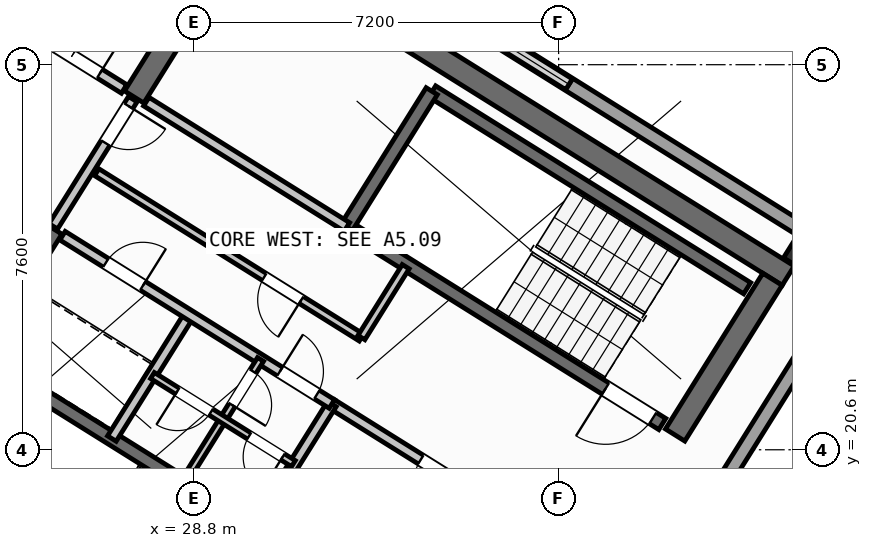
"""IFC4 building model, lengths in metres.
Left out: names, types, materials, properties, quantities, classifications, styles, units other than length and angle.
Written with IfcOpenShell. Run it as: python <this file> out.ifc"""

import sys

from ifc_helpers import new_model, si_unit, direction, frame, frame_2d, origin, origin_2d, place, context, subcontext, project, spatial, rectangle, hollow_rectangle, extrude, source, transform, mapped, element, fill, save


model = new_model("IFC4")
c1 = context("Model", 3, precision=1e-05, world=origin(), true_north=direction((0.0, 1.0)))
c2 = subcontext(c1, "Body", "Model", "MODEL_VIEW")
j1 = project(units=[si_unit("LENGTHUNIT", "METRE"), si_unit("PLANEANGLEUNIT", "RADIAN")], contexts=[c1])
p1 = place(None, origin())
s1 = spatial("IfcSite", under=j1, at=p1, CompositionType="ELEMENT")
p2 = place(p1, origin())
s2 = spatial("IfcBuilding", under=s1, at=p2, CompositionType="ELEMENT")
p3 = place(p2, frame((0.0, 0.0, 306.0)))
s3 = spatial("IfcBuildingStorey", under=s2, at=p3, CompositionType="ELEMENT", Elevation=306.0)
p4 = place(p3, frame((40.531, 24.036, 0.0), z_axis=(0.0, 0.0, 1.0), x_axis=(-0.848048787466, 0.529918157905, 0.0)))
e1 = element("IfcWall", 1, at=p4, inside=s3, PredefinedType="SHEAR", context=c2, shape_type="SweptSolid", body=[
    extrude(rectangle(XDim=13.04, YDim=0.45, at=frame_2d((6.52, 0.0))), origin(), (0.0, 0.0, 1.0), 3.32),
])
for number, where, z_axis, x_axis in (
    (2, (40.221, 23.965, 0.0), (0.0, 0.0, 1.0), (-0.53, -0.848, 0.0)),
    (3, (29.544, 30.636, 0.0), (0.0, 0.0, 1.0), (-0.53, -0.848, 0.0)),
):
    element("IfcWall", number, at=place(p3, frame(where, z_axis=z_axis, x_axis=x_axis)), inside=s3, PredefinedType="SHEAR", context=c2, shape_type="SweptSolid", body=[
        extrude(rectangle(XDim=3.625, YDim=0.45, at=frame_2d((1.812, 0.0))), origin(), (0.0, 0.0, 1.0), 3.32),
    ])
p5 = place(p3, frame((26.007, 24.976, 0.0), z_axis=(0.0, 0.0, 1.0), x_axis=(-0.529931155655, -0.848040665456, 0.0)))
e4 = element("IfcWall", 4, at=p5, inside=s3, PredefinedType="SHEAR", context=c2, shape_type="SweptSolid", body=[
    extrude(rectangle(XDim=6.475, YDim=0.45, at=frame_2d((3.238, 0.0))), origin(), (0.0, 0.0, 1.0), 3.32),
])
m1 = source(origin(), c2, "Body", "SweptSolid", [
    extrude(hollow_rectangle(XDim=0.5, YDim=0.5, WallThickness=0.025, at=origin_2d()), origin(), (0.0, 0.0, 1.0), 3.6),
])
p6 = place(p3, frame((40.783, 24.469, 0.0), z_axis=(0.0, 0.0, 1.0), x_axis=(-0.848048096156, 0.529919264233, 0.0)))
e5 = element("IfcColumn", 5, at=p6, inside=s3, PredefinedType="COLUMN", context=c2, shape_type="MappedRepresentation", body=[
    mapped(m1, transform((0.0, 0.0, 0.0), scale=1.0)),
])
p7 = place(p3, frame((41.182, 23.031, 0.0), z_axis=(0.0, 0.0, 1.0), x_axis=(-0.529922292894, -0.848046203632, 0.0)))
e6 = element("IfcWall", 6, at=p7, inside=s3, PredefinedType="STANDARD", context=c2, shape_type="SweptSolid", body=[
    extrude(rectangle(XDim=16.034, YDim=0.28, at=frame_2d((8.017, 0.0))), origin(), (0.0, 0.0, 1.0), 3.32),
])
p8 = place(p7, frame((7.167, 0.0, 0.85)))
e7 = element("IfcOpeningElement", 7, at=p8, cuts=e6, PredefinedType="OPENING", context=c2, shape_type="SweptSolid", body=[
    extrude(rectangle(XDim=1.7, YDim=1.6, at=frame_2d((0.85, 0.8))), frame((0.0, 0.15, 0.0), z_axis=(0.0, -1.0, 0.0), x_axis=(1.0, 0.0, 0.0)), (0.0, 0.0, 1.0), 0.3),
])
p9 = place(p3, frame((24.631, 35.045, 0.0), z_axis=(0.0, 0.0, 1.0), x_axis=(0.848046707212, -0.529921487002, 0.0)))
e8 = element("IfcWall", 8, at=p9, inside=s3, PredefinedType="STANDARD", context=c2, shape_type="SweptSolid", body=[
    extrude(rectangle(XDim=18.984, YDim=0.28, at=frame_2d((9.492, 0.0))), origin(), (0.0, 0.0, 1.0), 3.32),
])
p10 = place(p9, frame((2.326, 0.0, 0.85)))
e9 = element("IfcOpeningElement", 9, at=p10, cuts=e8, PredefinedType="OPENING", context=c2, shape_type="SweptSolid", body=[
    extrude(rectangle(XDim=1.7, YDim=1.6, at=frame_2d((0.85, 0.8))), frame((0.0, 0.15, 0.0), z_axis=(0.0, -1.0, 0.0), x_axis=(1.0, 0.0, 0.0)), (0.0, 0.0, 1.0), 0.3),
])
p11 = place(p9, frame((11.968, 0.0, 0.85)))
e10 = element("IfcOpeningElement", 10, at=p11, cuts=e8, PredefinedType="OPENING", context=c2, shape_type="SweptSolid", body=[
    extrude(rectangle(XDim=1.7, YDim=1.6, at=frame_2d((0.85, 0.8))), frame((0.0, 0.15, 0.0), z_axis=(0.0, -1.0, 0.0), x_axis=(1.0, 0.0, 0.0)), (0.0, 0.0, 1.0), 0.3),
])
p12 = place(p3, frame((31.28, 18.261, 0.0), z_axis=(0.0, 0.0, 1.0), x_axis=(-0.848051618787, 0.529913626805, 0.0)))
e11 = element("IfcWall", 11, at=p12, inside=s3, PredefinedType="SHEAR", context=c2, shape_type="SweptSolid", body=[
    extrude(rectangle(XDim=7.46, YDim=0.26, at=frame_2d((3.73, 0.0))), origin(), (0.0, 0.0, 1.0), 3.32),
])
p13 = place(p12, frame((0.36, 0.0, 0.0)))
e12 = element("IfcOpeningElement", 12, at=p13, cuts=e11, PredefinedType="OPENING", context=c2, shape_type="SweptSolid", body=[
    extrude(rectangle(XDim=0.86, YDim=2.05, at=frame_2d((0.43, 1.025))), frame((0.0, 0.14, 0.0), z_axis=(0.0, -1.0, 0.0), x_axis=(1.0, 0.0, 0.0)), (0.0, 0.0, 1.0), 0.28),
])
p14 = place(p3, frame((39.721, 23.788, 0.0), z_axis=(0.0, 0.0, 1.0), x_axis=(-0.848054434086, 0.529909121291, 0.0)))
e13 = element("IfcWall", 13, at=p14, inside=s3, PredefinedType="SHEAR", context=c2, shape_type="SweptSolid", body=[
    extrude(rectangle(XDim=7.33, YDim=0.26, at=frame_2d((3.665, 0.0))), origin(), (0.0, 0.0, 1.0), 3.32),
])
p15 = place(p3, frame((38.046, 21.108, 0.0), z_axis=(0.0, 0.0, 1.0), x_axis=(-0.848054434086, 0.529909121291, 0.0)))
e14 = element("IfcWall", 14, at=p15, inside=s3, PredefinedType="SHEAR", context=c2, shape_type="SweptSolid", body=[
    extrude(rectangle(XDim=7.33, YDim=0.26, at=frame_2d((3.665, 0.0))), origin(), (0.0, 0.0, 1.0), 3.32),
])
p16 = place(p15, frame((0.22, 0.0, 0.0)))
e15 = element("IfcOpeningElement", 15, at=p16, cuts=e14, PredefinedType="OPENING", context=c2, shape_type="SweptSolid", body=[
    extrude(rectangle(XDim=1.1, YDim=2.1, at=frame_2d((0.55, 1.05))), frame((0.0, 0.14, 0.0), z_axis=(0.0, -1.0, 0.0), x_axis=(1.0, 0.0, 0.0)), (0.0, 0.0, 1.0), 0.28),
])
p17 = place(p3, frame((33.496, 27.677, 0.0), z_axis=(0.0, 0.0, 1.0), x_axis=(-0.529908658664, -0.84805472316, 0.0)))
e16 = element("IfcWall", 16, at=p17, inside=s3, PredefinedType="SHEAR", context=c2, shape_type="SweptSolid", body=[
    extrude(rectangle(XDim=3.16, YDim=0.26, at=frame_2d((1.58, 0.0))), origin(), (0.0, 0.0, 1.0), 3.32),
])
p18 = place(p3, frame((36.459, 18.421, 0.0), z_axis=(0.0, 0.0, 1.0), x_axis=(-0.848059591691, 0.529900867089, 0.0)))
e17 = element("IfcWall", 17, at=p18, inside=s3, PredefinedType="STANDARD", context=c2, shape_type="SweptSolid", body=[
    extrude(rectangle(XDim=5.818, YDim=0.2, at=frame_2d((2.909, 0.0))), origin(), (0.0, 0.0, 1.0), 3.31),
])
p19 = place(p18, frame((2.598, 0.0, 0.0)))
e18 = element("IfcOpeningElement", 18, at=p19, cuts=e17, PredefinedType="OPENING", context=c2, shape_type="SweptSolid", body=[
    extrude(rectangle(XDim=1.15, YDim=2.1, at=frame_2d((0.575, 1.05))), frame((0.0, 0.11, 0.0), z_axis=(0.0, -1.0, 0.0), x_axis=(1.0, 0.0, 0.0)), (0.0, 0.0, 1.0), 0.22),
])
p20 = place(p3, frame((31.822, 24.998, 0.0), z_axis=(0.0, 0.0, 1.0), x_axis=(-0.848054125777, 0.529909614701, 0.0)))
e19 = element("IfcWall", 19, at=p20, inside=s3, PredefinedType="STANDARD", context=c2, shape_type="SweptSolid", body=[
    extrude(rectangle(XDim=4.668, YDim=0.2, at=frame_2d((2.334, 0.0))), origin(), (0.0, 0.0, 1.0), 3.31),
])
p21 = place(p3, frame((32.108, 22.814, 0.0), z_axis=(0.0, 0.0, 1.0), x_axis=(-0.848047283855, 0.529920564185, 0.0)))
e20 = element("IfcWall", 20, at=p21, inside=s3, PredefinedType="PARTITIONING", context=c2, shape_type="SweptSolid", body=[
    extrude(rectangle(XDim=6.16, YDim=0.16, at=frame_2d((3.08, 0.0))), origin(), (0.0, 0.0, 1.0), 3.31),
])
p22 = place(p21, frame((1.4, 0.0, 0.0)))
e21 = element("IfcOpeningElement", 21, at=p22, cuts=e20, PredefinedType="OPENING", context=c2, shape_type="SweptSolid", body=[
    extrude(rectangle(XDim=0.86, YDim=2.05, at=frame_2d((0.43, 1.025))), frame((0.0, 0.09, 0.0), z_axis=(0.0, -1.0, 0.0), x_axis=(1.0, 0.0, 0.0)), (0.0, 0.0, 1.0), 0.18),
])
p23 = place(p3, frame((32.982, 24.213, 0.0), z_axis=(0.0, 0.0, 1.0), x_axis=(-0.529839334948, -0.84809803628, 0.0)))
e22 = element("IfcWall", 22, at=p23, inside=s3, PredefinedType="PARTITIONING", context=c2, shape_type="SweptSolid", body=[
    extrude(rectangle(XDim=1.65, YDim=0.16, at=frame_2d((0.825, 0.0))), origin(), (0.0, 0.0, 1.0), 3.31),
])
for number, where, z_axis, x_axis in (
    (23, (31.525, 21.504, 0.0), (0.0, 0.0, 1.0), (-0.53, -0.848, 0.0)),
    (24, (28.71, 23.263, 0.0), (0.0, 0.0, 1.0), (-0.53, -0.848, 0.0)),
):
    element("IfcWall", number, at=place(p3, frame(where, z_axis=z_axis, x_axis=x_axis)), inside=s3, PredefinedType="STANDARD", context=c2, shape_type="SweptSolid", body=[
        extrude(rectangle(XDim=2.88, YDim=0.2, at=frame_2d((1.44, 0.0))), origin(), (0.0, 0.0, 1.0), 3.31),
    ])
p24 = place(p3, frame((31.525, 21.504, 0.0), z_axis=(0.0, 0.0, 1.0), x_axis=(-0.848042066329, 0.529928913853, 0.0)))
e25 = element("IfcWall", 25, at=p24, inside=s3, PredefinedType="STANDARD", context=c2, shape_type="SweptSolid", body=[
    extrude(rectangle(XDim=6.268, YDim=0.2, at=frame_2d((3.134, 0.0))), origin(), (0.0, 0.0, 1.0), 3.31),
])
p25 = place(p24, frame((4.4, 0.0, 0.0)))
e26 = element("IfcOpeningElement", 26, at=p25, cuts=e25, PredefinedType="OPENING", context=c2, shape_type="SweptSolid", body=[
    extrude(rectangle(XDim=0.86, YDim=2.05, at=frame_2d((0.43, 1.025))), frame((0.0, 0.11, 0.0), z_axis=(0.0, -1.0, 0.0), x_axis=(1.0, 0.0, 0.0)), (0.0, 0.0, 1.0), 0.22),
])
p26 = place(p24, frame((0.35, 0.0, 0.0)))
e27 = element("IfcOpeningElement", 27, at=p26, cuts=e25, PredefinedType="OPENING", context=c2, shape_type="SweptSolid", body=[
    extrude(rectangle(XDim=0.86, YDim=2.05, at=frame_2d((0.43, 1.025))), frame((0.0, 0.11, 0.0), z_axis=(0.0, -1.0, 0.0), x_axis=(1.0, 0.0, 0.0)), (0.0, 0.0, 1.0), 0.22),
])
p27 = place(p3, frame((30.117, 22.384, 0.0), z_axis=(0.0, 0.0, 1.0), x_axis=(-0.529951914384, -0.848027693204, 0.0)))
e28 = element("IfcWall", 28, at=p27, inside=s3, PredefinedType="PLUMBINGWALL", context=c2, shape_type="SweptSolid", body=[
    extrude(rectangle(XDim=1.4, YDim=0.14, at=frame_2d((0.7, 0.0))), origin(), (0.0, 0.0, 1.0), 3.31),
])
p28 = place(p27, frame((0.28, 0.0, 0.0)))
e29 = element("IfcOpeningElement", 29, at=p28, cuts=e28, PredefinedType="OPENING", context=c2, shape_type="SweptSolid", body=[
    extrude(rectangle(XDim=0.78, YDim=2.05, at=frame_2d((0.39, 1.025))), frame((0.0, 0.08, 0.0), z_axis=(0.0, -1.0, 0.0), x_axis=(1.0, 0.0, 0.0)), (0.0, 0.0, 1.0), 0.16),
])
p29 = place(p3, frame((29.375, 21.196, 0.0), z_axis=(0.0, 0.0, 1.0), x_axis=(-0.529865479138, -0.848081702443, 0.0)))
e30 = element("IfcWall", 30, at=p29, inside=s3, PredefinedType="PLUMBINGWALL", context=c2, shape_type="SweptSolid", body=[
    extrude(rectangle(XDim=1.48, YDim=0.14, at=frame_2d((0.74, 0.0))), origin(), (0.0, 0.0, 1.0), 3.31),
])
p30 = place(p3, frame((30.766, 20.327, 0.0), z_axis=(0.0, 0.0, 1.0), x_axis=(-0.848052663127, 0.529911955482, 0.0)))
e31 = element("IfcWall", 31, at=p30, inside=s3, PredefinedType="PLUMBINGWALL", context=c2, shape_type="SweptSolid", body=[
    extrude(rectangle(XDim=3.28, YDim=0.14, at=frame_2d((1.64, 0.0))), origin(), (0.0, 0.0, 1.0), 3.31),
])
p31 = place(p30, frame((0.25, 0.0, 0.0)))
e32 = element("IfcOpeningElement", 32, at=p31, cuts=e31, PredefinedType="OPENING", context=c2, shape_type="SweptSolid", body=[
    extrude(rectangle(XDim=0.78, YDim=2.05, at=frame_2d((0.39, 1.025))), frame((0.0, 0.08, 0.0), z_axis=(0.0, -1.0, 0.0), x_axis=(1.0, 0.0, 0.0)), (0.0, 0.0, 1.0), 0.16),
])
p32 = place(p30, frame((1.92, 0.0, 0.0)))
e33 = element("IfcOpeningElement", 33, at=p32, cuts=e31, PredefinedType="OPENING", context=c2, shape_type="SweptSolid", body=[
    extrude(rectangle(XDim=0.78, YDim=2.05, at=frame_2d((0.39, 1.025))), frame((0.0, 0.08, 0.0), z_axis=(0.0, -1.0, 0.0), x_axis=(1.0, 0.0, 0.0)), (0.0, 0.0, 1.0), 0.16),
])
p33 = place(p3, frame((27.596, 27.52, 0.0), z_axis=(0.0, 0.0, 1.0), x_axis=(-0.529865479138, -0.848081702443, 0.0)))
e34 = element("IfcWall", 34, at=p33, inside=s3, PredefinedType="STANDARD", context=c2, shape_type="SweptSolid", body=[
    extrude(rectangle(XDim=2.96, YDim=0.2, at=frame_2d((1.48, 0.0))), origin(), (0.0, 0.0, 1.0), 3.31),
])
p34 = place(p33, frame((0.16, 0.0, 0.0)))
e35 = element("IfcOpeningElement", 35, at=p34, cuts=e34, PredefinedType="OPENING", context=c2, shape_type="SweptSolid", body=[
    extrude(rectangle(XDim=0.86, YDim=2.05, at=frame_2d((0.43, 1.025))), frame((0.0, 0.11, 0.0), z_axis=(0.0, -1.0, 0.0), x_axis=(1.0, 0.0, 0.0)), (0.0, 0.0, 1.0), 0.22),
])
p35 = place(p3, frame((27.425, 27.721, 0.0), z_axis=(0.0, 0.0, 1.0), x_axis=(-0.848060820519, 0.529898900452, 0.0)))
e36 = element("IfcWall", 36, at=p35, inside=s3, PredefinedType="STANDARD", context=c2, shape_type="SweptSolid", body=[
    extrude(rectangle(XDim=7.678, YDim=0.2, at=frame_2d((3.839, 0.0))), origin(), (0.0, 0.0, 1.0), 3.31),
])
p36 = place(p35, frame((0.568, 0.0, 0.0)))
e37 = element("IfcOpeningElement", 37, at=p36, cuts=e36, PredefinedType="OPENING", context=c2, shape_type="SweptSolid", body=[
    extrude(rectangle(XDim=1.3, YDim=2.15, at=frame_2d((0.65, 1.075))), frame((0.0, 0.11, 0.0), z_axis=(0.0, -1.0, 0.0), x_axis=(1.0, 0.0, 0.0)), (0.0, 0.0, 1.0), 0.22),
])
m2 = source(origin(), c2, "Body", "SweptSolid", [
    extrude(rectangle(XDim=1.7, YDim=1.6, at=frame_2d((0.85, 0.8))), frame((0.0, 0.03, 0.0), z_axis=(0.0, -1.0, 0.0), x_axis=(1.0, 0.0, 0.0)), (0.0, 0.0, 1.0), 0.06),
])
p37 = place(p11, origin())
e38 = element("IfcWindow", 38, at=p37, inside=s3, PartitioningType="SINGLE_PANEL", PredefinedType="WINDOW", context=c2, shape_type="MappedRepresentation", body=[
    mapped(m2, transform((0.0, 0.0, 0.0), scale=1.0)),
])
fill(e10, e38)
m3 = source(origin(), c2, "Body", "SweptSolid", [
    extrude(rectangle(XDim=0.86, YDim=2.05, at=frame_2d((0.43, 1.025))), frame((0.0, 0.025, 0.0), z_axis=(0.0, -1.0, 0.0), x_axis=(1.0, 0.0, 0.0)), (0.0, 0.0, 1.0), 0.05),
])
p38 = place(p22, origin())
e39 = element("IfcDoor", 39, at=p38, inside=s3, OperationType="SINGLE_SWING_LEFT", PredefinedType="DOOR", context=c2, shape_type="MappedRepresentation", body=[
    mapped(m3, transform((0.0, 0.0, 0.0), scale=1.0)),
])
fill(e21, e39)
m4 = source(origin(), c2, "Body", "SweptSolid", [
    extrude(rectangle(XDim=1.1, YDim=2.1, at=frame_2d((0.55, 1.05))), frame((0.0, 0.025, 0.0), z_axis=(0.0, -1.0, 0.0), x_axis=(1.0, 0.0, 0.0)), (0.0, 0.0, 1.0), 0.05),
])
p39 = place(p16, origin())
e40 = element("IfcDoor", 40, at=p39, inside=s3, OperationType="SINGLE_SWING_RIGHT", PredefinedType="DOOR", context=c2, shape_type="MappedRepresentation", body=[
    mapped(m4, transform((0.0, 0.0, 0.0), scale=1.0)),
])
fill(e15, e40)
m5 = source(origin(), c2, "Body", "SweptSolid", [
    extrude(rectangle(XDim=1.15, YDim=2.1, at=frame_2d((0.575, 1.05))), frame((0.0, 0.025, 0.0), z_axis=(0.0, -1.0, 0.0), x_axis=(1.0, 0.0, 0.0)), (0.0, 0.0, 1.0), 0.05),
])
p40 = place(p19, origin())
e41 = element("IfcDoor", 41, at=p40, inside=s3, OperationType="SINGLE_SWING_LEFT", PredefinedType="DOOR", context=c2, shape_type="MappedRepresentation", body=[
    mapped(m5, transform((0.0, 0.0, 0.0), scale=1.0)),
])
fill(e18, e41)
p41 = place(p25, frame((0.86, 0.0, 0.0), z_axis=(0.0, 0.0, 1.0), x_axis=(-1.0, 0.0, 0.0)))
e42 = element("IfcDoor", 42, at=p41, inside=s3, OperationType="SINGLE_SWING_RIGHT", PredefinedType="DOOR", context=c2, shape_type="MappedRepresentation", body=[
    mapped(m3, transform((0.0, 0.0, 0.0), scale=1.0)),
])
fill(e26, e42)
p42 = place(p26, frame((0.86, 0.0, 0.0), z_axis=(0.0, 0.0, 1.0), x_axis=(-1.0, 0.0, 0.0)))
e43 = element("IfcDoor", 43, at=p42, inside=s3, OperationType="SINGLE_SWING_LEFT", PredefinedType="DOOR", context=c2, shape_type="MappedRepresentation", body=[
    mapped(m3, transform((0.0, 0.0, 0.0), scale=1.0)),
])
fill(e27, e43)
m6 = source(origin(), c2, "Body", "SweptSolid", [
    extrude(rectangle(XDim=0.78, YDim=2.05, at=frame_2d((0.39, 1.025))), frame((0.0, 0.025, 0.0), z_axis=(0.0, -1.0, 0.0), x_axis=(1.0, 0.0, 0.0)), (0.0, 0.0, 1.0), 0.05),
])
p43 = place(p28, origin())
e44 = element("IfcDoor", 44, at=p43, inside=s3, OperationType="SINGLE_SWING_RIGHT", PredefinedType="DOOR", context=c2, shape_type="MappedRepresentation", body=[
    mapped(m6, transform((0.0, 0.0, 0.0), scale=1.0)),
])
fill(e29, e44)
p44 = place(p31, origin())
e45 = element("IfcDoor", 45, at=p44, inside=s3, OperationType="SINGLE_SWING_LEFT", PredefinedType="DOOR", context=c2, shape_type="MappedRepresentation", body=[
    mapped(m6, transform((0.0, 0.0, 0.0), scale=1.0)),
])
fill(e32, e45)
p45 = place(p32, origin())
e46 = element("IfcDoor", 46, at=p45, inside=s3, OperationType="SINGLE_SWING_RIGHT", PredefinedType="DOOR", context=c2, shape_type="MappedRepresentation", body=[
    mapped(m6, transform((0.0, 0.0, 0.0), scale=1.0)),
])
fill(e33, e46)
p46 = place(p34, origin())
e47 = element("IfcDoor", 47, at=p46, inside=s3, OperationType="SINGLE_SWING_LEFT", PredefinedType="DOOR", context=c2, shape_type="MappedRepresentation", body=[
    mapped(m3, transform((0.0, 0.0, 0.0), scale=1.0)),
])
fill(e35, e47)
m7 = source(origin(), c2, "Body", "SweptSolid", [
    extrude(rectangle(XDim=1.3, YDim=2.15, at=frame_2d((0.65, 1.075))), frame((0.0, 0.025, 0.0), z_axis=(0.0, -1.0, 0.0), x_axis=(1.0, 0.0, 0.0)), (0.0, 0.0, 1.0), 0.05),
])
p47 = place(p36, frame((1.3, 0.0, 0.0), z_axis=(0.0, 0.0, 1.0), x_axis=(-1.0, 0.0, 0.0)))
e48 = element("IfcDoor", 48, at=p47, inside=s3, OperationType="DOUBLE_DOOR_SINGLE_SWING", PredefinedType="DOOR", context=c2, shape_type="MappedRepresentation", body=[
    mapped(m7, transform((0.0, 0.0, 0.0), scale=1.0)),
])
fill(e37, e48)
save(model, sys.argv[1])
